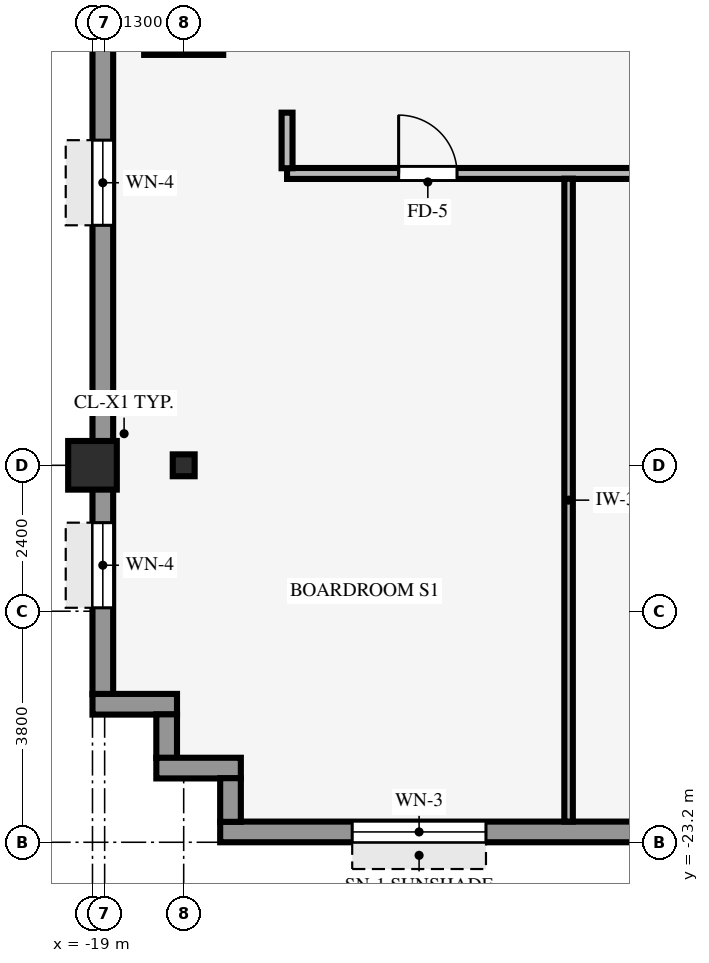
"""IFC4 building model, lengths in metres.
Left out: names, types, materials, properties, quantities, classifications, styles, units other than length and angle.
Written with IfcOpenShell. Run it as: python <this file> out.ifc"""

import sys

from ifc_helpers import new_model, si_unit, direction, frame, frame_2d, origin, origin_2d, place, context, subcontext, project, spatial, rectangle, hollow_rectangle, i_section, extrude, source, transform, mapped, element, fill, save


model = new_model("IFC4")
c1 = context("Model", 3, precision=1e-05, world=origin(), true_north=direction((0.0, 1.0)))
c2 = subcontext(c1, "Body", "Model", "MODEL_VIEW")
j1 = project(units=[si_unit("LENGTHUNIT", "METRE"), si_unit("PLANEANGLEUNIT", "RADIAN")], contexts=[c1])
p1 = place(None, origin())
s1 = spatial("IfcSite", under=j1, at=p1, CompositionType="ELEMENT")
p2 = place(p1, origin())
s2 = spatial("IfcBuilding", under=s1, at=p2, CompositionType="ELEMENT")
p3 = place(p2, frame((0.0, 0.0, 27.6)))
s3 = spatial("IfcBuildingStorey", under=s2, at=p3, CompositionType="ELEMENT", Elevation=27.6)
p4 = place(p3, frame((-17.5, -9.6, 0.0), z_axis=(0.0, 0.0, 1.0), x_axis=(1.0, 0.0, 0.0)))
e1 = element("IfcColumn", 1, at=p4, inside=s3, PredefinedType="COLUMN", context=c2, shape_type="SweptSolid", body=[
    extrude(rectangle(XDim=1.3, YDim=1.3, at=origin_2d()), origin(), (0.0, 0.0, 1.0), 3.37),
])
p5 = place(p3, frame((-19.0, -17.0, 0.0), z_axis=(0.0, 0.0, 1.0), x_axis=(1.0, 0.0, 0.0)))
e2 = element("IfcColumn", 2, at=p5, inside=s3, PredefinedType="COLUMN", context=c2, shape_type="SweptSolid", body=[
    extrude(hollow_rectangle(XDim=0.8, YDim=0.8, WallThickness=0.055, InnerFilletRadius=0.055, OuterFilletRadius=0.11, at=origin_2d()), origin(), (0.0, 0.0, 1.0), 3.37),
])
p6 = place(p3, frame((-17.5, -17.0, -0.4), z_axis=(0.0, 0.0, 1.0), x_axis=(1.0, 0.0, 0.0)))
e3 = element("IfcColumn", 3, at=p6, inside=s3, PredefinedType="COLUMN", context=c2, shape_type="SweptSolid", body=[
    extrude(i_section(OverallWidth=0.36, OverallDepth=0.36, WebThickness=0.021, FlangeThickness=0.021, FilletRadius=0.018, at=origin_2d()), origin(), (0.0, 0.0, 1.0), 3.77),
])
p7 = place(p3, frame((-16.9, -23.03, 0.0), z_axis=(0.0, 0.0, 1.0), x_axis=(1.0, 0.0, 0.0)))
e4 = element("IfcWall", 4, at=p7, inside=s3, PredefinedType="STANDARD", context=c2, shape_type="SweptSolid", body=[
    extrude(rectangle(XDim=33.8, YDim=0.34, at=frame_2d((16.9, 0.0))), origin(), (0.0, 0.0, 1.0), 2.705),
])
p8 = place(p7, frame((22.4, 0.0, 0.0), z_axis=(0.0, 0.0, 1.0), x_axis=(-1.0, 0.0, 0.0)))
e5 = element("IfcOpeningElement", 5, at=p8, cuts=e4, PredefinedType="OPENING", context=c2, shape_type="SweptSolid", body=[
    extrude(rectangle(XDim=1.05, YDim=2.1, at=frame_2d((0.525, 1.05))), frame((0.0, 0.18, 0.0), z_axis=(0.0, -1.0, 0.0), x_axis=(1.0, 0.0, 0.0)), (0.0, 0.0, 1.0), 0.36),
])
p9 = place(p7, frame((2.171, 0.0, 0.8)))
e6 = element("IfcOpeningElement", 6, at=p9, cuts=e4, PredefinedType="OPENING", context=c2, shape_type="SweptSolid", body=[
    extrude(rectangle(XDim=2.2, YDim=1.65, at=frame_2d((1.1, 0.825))), frame((0.0, 0.18, 0.0), z_axis=(0.0, -1.0, 0.0), x_axis=(1.0, 0.0, 0.0)), (0.0, 0.0, 1.0), 0.36),
])
p10 = place(p7, frame((11.707, 0.0, 0.8)))
e7 = element("IfcOpeningElement", 7, at=p10, cuts=e4, PredefinedType="OPENING", context=c2, shape_type="SweptSolid", body=[
    extrude(rectangle(XDim=2.2, YDim=1.65, at=frame_2d((1.1, 0.825))), frame((0.0, 0.18, 0.0), z_axis=(0.0, -1.0, 0.0), x_axis=(1.0, 0.0, 0.0)), (0.0, 0.0, 1.0), 0.36),
])
p11 = place(p7, frame((29.429, 0.0, 0.8)))
e8 = element("IfcOpeningElement", 8, at=p11, cuts=e4, PredefinedType="OPENING", context=c2, shape_type="SweptSolid", body=[
    extrude(rectangle(XDim=2.2, YDim=1.65, at=frame_2d((1.1, 0.825))), frame((0.0, 0.18, 0.0), z_axis=(0.0, -1.0, 0.0), x_axis=(1.0, 0.0, 0.0)), (0.0, 0.0, 1.0), 0.36),
])
p12 = place(p3, frame((-18.83, -20.764, 0.0), z_axis=(0.0, 0.0, 1.0), x_axis=(0.0, 1.0, 0.0)))
e9 = element("IfcWall", 9, at=p12, inside=s3, PredefinedType="STANDARD", context=c2, shape_type="SweptSolid", body=[
    extrude(rectangle(XDim=41.528, YDim=0.34, at=frame_2d((20.764, 0.0))), origin(), (0.0, 0.0, 1.0), 2.705),
])
p13 = place(p12, frame((33.464, 0.0, 0.0)))
e10 = element("IfcOpeningElement", 10, at=p13, cuts=e9, PredefinedType="OPENING", context=c2, shape_type="SweptSolid", body=[
    extrude(rectangle(XDim=1.05, YDim=2.1, at=frame_2d((0.525, 1.05))), frame((0.0, 0.18, 0.0), z_axis=(0.0, -1.0, 0.0), x_axis=(1.0, 0.0, 0.0)), (0.0, 0.0, 1.0), 0.36),
])
p14 = place(p12, frame((1.42, 0.0, 0.8)))
e11 = element("IfcOpeningElement", 11, at=p14, cuts=e9, PredefinedType="OPENING", context=c2, shape_type="SweptSolid", body=[
    extrude(rectangle(XDim=1.4, YDim=1.65, at=frame_2d((0.7, 0.825))), frame((0.0, 0.18, 0.0), z_axis=(0.0, -1.0, 0.0), x_axis=(1.0, 0.0, 0.0)), (0.0, 0.0, 1.0), 0.36),
])
p15 = place(p12, frame((7.711, 0.0, 0.8)))
e12 = element("IfcOpeningElement", 12, at=p15, cuts=e9, PredefinedType="OPENING", context=c2, shape_type="SweptSolid", body=[
    extrude(rectangle(XDim=1.4, YDim=1.65, at=frame_2d((0.7, 0.825))), frame((0.0, 0.18, 0.0), z_axis=(0.0, -1.0, 0.0), x_axis=(1.0, 0.0, 0.0)), (0.0, 0.0, 1.0), 0.36),
])
p16 = place(p12, frame((38.708, 0.0, 0.8)))
e13 = element("IfcOpeningElement", 13, at=p16, cuts=e9, PredefinedType="OPENING", context=c2, shape_type="SweptSolid", body=[
    extrude(rectangle(XDim=1.4, YDim=1.65, at=frame_2d((0.7, 0.825))), frame((0.0, 0.18, 0.0), z_axis=(0.0, -1.0, 0.0), x_axis=(1.0, 0.0, 0.0)), (0.0, 0.0, 1.0), 0.36),
])
p17 = place(p3, frame((-19.0, -20.93, 0.0), z_axis=(0.0, 0.0, 1.0), x_axis=(1.0, 0.0, 0.0)))
e14 = element("IfcWall", 14, at=p17, inside=s3, PredefinedType="STANDARD", context=c2, shape_type="SweptSolid", body=[
    extrude(rectangle(XDim=1.39, YDim=0.34, at=frame_2d((0.695, 0.0))), origin(), (0.0, 0.0, 1.0), 3.36),
])
p18 = place(p3, frame((-17.78, -21.814, 0.0), z_axis=(0.0, 0.0, 1.0), x_axis=(0.0, 1.0, 0.0)))
e15 = element("IfcWall", 15, at=p18, inside=s3, PredefinedType="STANDARD", context=c2, shape_type="SweptSolid", body=[
    extrude(rectangle(XDim=0.718, YDim=0.34, at=frame_2d((0.359, 0.0))), origin(), (0.0, 0.0, 1.0), 3.36),
])
p19 = place(p3, frame((-17.95, -21.98, 0.0), z_axis=(0.0, 0.0, 1.0), x_axis=(1.0, 0.0, 0.0)))
e16 = element("IfcWall", 16, at=p19, inside=s3, PredefinedType="STANDARD", context=c2, shape_type="SweptSolid", body=[
    extrude(rectangle(XDim=1.39, YDim=0.34, at=frame_2d((0.695, 0.0))), origin(), (0.0, 0.0, 1.0), 3.36),
])
p20 = place(p3, frame((-16.73, -22.864, 0.0), z_axis=(0.0, 0.0, 1.0), x_axis=(0.0, 1.0, 0.0)))
e17 = element("IfcWall", 17, at=p20, inside=s3, PredefinedType="STANDARD", context=c2, shape_type="SweptSolid", body=[
    extrude(rectangle(XDim=0.718, YDim=0.34, at=frame_2d((0.359, 0.0))), origin(), (0.0, 0.0, 1.0), 3.36),
])
p21 = place(p3, frame((-15.8, -12.2, 0.0), z_axis=(0.0, 0.0, 1.0), x_axis=(1.0, 0.0, 0.0)))
e18 = element("IfcWall", 18, at=p21, inside=s3, PredefinedType="PARTITIONING", context=c2, shape_type="SweptSolid", body=[
    extrude(rectangle(XDim=31.6, YDim=0.18, at=frame_2d((15.8, 0.0))), origin(), (0.0, 0.0, 1.0), 3.36),
])
p22 = place(p21, frame((6.88, 0.0, 0.0)))
e19 = element("IfcOpeningElement", 19, at=p22, cuts=e18, PredefinedType="OPENING", context=c2, shape_type="SweptSolid", body=[
    extrude(rectangle(XDim=0.96, YDim=2.1, at=frame_2d((0.48, 1.05))), frame((0.0, 0.1, 0.0), z_axis=(0.0, -1.0, 0.0), x_axis=(1.0, 0.0, 0.0)), (0.0, 0.0, 1.0), 0.2),
])
p23 = place(p21, frame((16.895, 0.0, 0.0)))
e20 = element("IfcOpeningElement", 20, at=p23, cuts=e18, PredefinedType="OPENING", context=c2, shape_type="SweptSolid", body=[
    extrude(rectangle(XDim=0.96, YDim=2.1, at=frame_2d((0.48, 1.05))), frame((0.0, 0.1, 0.0), z_axis=(0.0, -1.0, 0.0), x_axis=(1.0, 0.0, 0.0)), (0.0, 0.0, 1.0), 0.2),
])
p24 = place(p21, frame((1.835, 0.0, 0.0)))
e21 = element("IfcOpeningElement", 21, at=p24, cuts=e18, PredefinedType="OPENING", context=c2, shape_type="SweptSolid", body=[
    extrude(rectangle(XDim=0.96, YDim=2.1, at=frame_2d((0.48, 1.05))), frame((0.0, 0.1, 0.0), z_axis=(0.0, -1.0, 0.0), x_axis=(1.0, 0.0, 0.0)), (0.0, 0.0, 1.0), 0.2),
])
p25 = place(p21, frame((21.25, 0.0, 0.0)))
e22 = element("IfcOpeningElement", 22, at=p25, cuts=e18, PredefinedType="OPENING", context=c2, shape_type="SweptSolid", body=[
    extrude(rectangle(XDim=0.96, YDim=2.1, at=frame_2d((0.48, 1.05))), frame((0.0, 0.1, 0.0), z_axis=(0.0, -1.0, 0.0), x_axis=(1.0, 0.0, 0.0)), (0.0, 0.0, 1.0), 0.2),
])
p26 = place(p21, frame((25.21, 0.0, 0.0)))
e23 = element("IfcOpeningElement", 23, at=p26, cuts=e18, PredefinedType="OPENING", context=c2, shape_type="SweptSolid", body=[
    extrude(rectangle(XDim=0.96, YDim=2.1, at=frame_2d((0.48, 1.05))), frame((0.0, 0.1, 0.0), z_axis=(0.0, -1.0, 0.0), x_axis=(1.0, 0.0, 0.0)), (0.0, 0.0, 1.0), 0.2),
])
p27 = place(p21, frame((29.155, 0.0, 0.0)))
e24 = element("IfcOpeningElement", 24, at=p27, cuts=e18, PredefinedType="OPENING", context=c2, shape_type="SweptSolid", body=[
    extrude(rectangle(XDim=0.96, YDim=2.1, at=frame_2d((0.48, 1.05))), frame((0.0, 0.1, 0.0), z_axis=(0.0, -1.0, 0.0), x_axis=(1.0, 0.0, 0.0)), (0.0, 0.0, 1.0), 0.2),
])
p28 = place(p21, frame((10.865, 0.0, 0.0)))
e25 = element("IfcOpeningElement", 25, at=p28, cuts=e18, PredefinedType="OPENING", context=c2, shape_type="SweptSolid", body=[
    extrude(rectangle(XDim=0.96, YDim=2.1, at=frame_2d((0.48, 1.05))), frame((0.0, 0.1, 0.0), z_axis=(0.0, -1.0, 0.0), x_axis=(1.0, 0.0, 0.0)), (0.0, 0.0, 1.0), 0.2),
])
p29 = place(p3, frame((-15.8, -12.114, 0.0), z_axis=(0.0, 0.0, 1.0), x_axis=(0.0, 1.0, 0.0)))
e26 = element("IfcWall", 26, at=p29, inside=s3, PredefinedType="PARTITIONING", context=c2, shape_type="SweptSolid", body=[
    extrude(rectangle(XDim=0.914, YDim=0.18, at=frame_2d((0.457, 0.0))), origin(), (0.0, 0.0, 1.0), 3.36),
])
p30 = place(p3, frame((-11.17, -22.86, 0.0), z_axis=(0.0, 0.0, 1.0), x_axis=(0.0, 1.0, 0.0)))
e27 = element("IfcWall", 27, at=p30, inside=s3, PredefinedType="PARTITIONING", context=c2, shape_type="SweptSolid", body=[
    extrude(rectangle(XDim=10.574, YDim=0.14, at=frame_2d((5.287, 0.0))), origin(), (0.0, 0.0, 1.0), 3.36),
])
m1 = source(origin(), c2, "Body", "SweptSolid", [
    extrude(rectangle(XDim=2.2, YDim=1.65, at=frame_2d((1.1, 0.825))), frame((0.0, 0.03, 0.0), z_axis=(0.0, -1.0, 0.0), x_axis=(1.0, 0.0, 0.0)), (0.0, 0.0, 1.0), 0.06),
])
p31 = place(p9, origin())
e28 = element("IfcWindow", 28, at=p31, inside=s3, PartitioningType="SINGLE_PANEL", PredefinedType="WINDOW", context=c2, shape_type="MappedRepresentation", body=[
    mapped(m1, transform((0.0, 0.0, 0.0), scale=1.0)),
])
fill(e6, e28)
m2 = source(origin(), c2, "Body", "SweptSolid", [
    extrude(rectangle(XDim=1.4, YDim=1.65, at=frame_2d((0.7, 0.825))), frame((0.0, 0.03, 0.0), z_axis=(0.0, -1.0, 0.0), x_axis=(1.0, 0.0, 0.0)), (0.0, 0.0, 1.0), 0.06),
])
p32 = place(p14, origin())
e29 = element("IfcWindow", 29, at=p32, inside=s3, PartitioningType="SINGLE_PANEL", PredefinedType="WINDOW", context=c2, shape_type="MappedRepresentation", body=[
    mapped(m2, transform((0.0, 0.0, 0.0), scale=1.0)),
])
fill(e11, e29)
p33 = place(p15, origin())
e30 = element("IfcWindow", 30, at=p33, inside=s3, PartitioningType="SINGLE_PANEL", PredefinedType="WINDOW", context=c2, shape_type="MappedRepresentation", body=[
    mapped(m2, transform((0.0, 0.0, 0.0), scale=1.0)),
])
fill(e12, e30)
m3 = source(origin(), c2, "Body", "SweptSolid", [
    extrude(rectangle(XDim=0.96, YDim=2.1, at=frame_2d((0.48, 1.05))), frame((0.0, 0.025, 0.0), z_axis=(0.0, -1.0, 0.0), x_axis=(1.0, 0.0, 0.0)), (0.0, 0.0, 1.0), 0.05),
])
p34 = place(p24, origin())
e31 = element("IfcDoor", 31, at=p34, inside=s3, OperationType="SINGLE_SWING_LEFT", PredefinedType="DOOR", context=c2, shape_type="MappedRepresentation", body=[
    mapped(m3, transform((0.0, 0.0, 0.0), scale=1.0)),
])
fill(e21, e31)
save(model, sys.argv[1])
